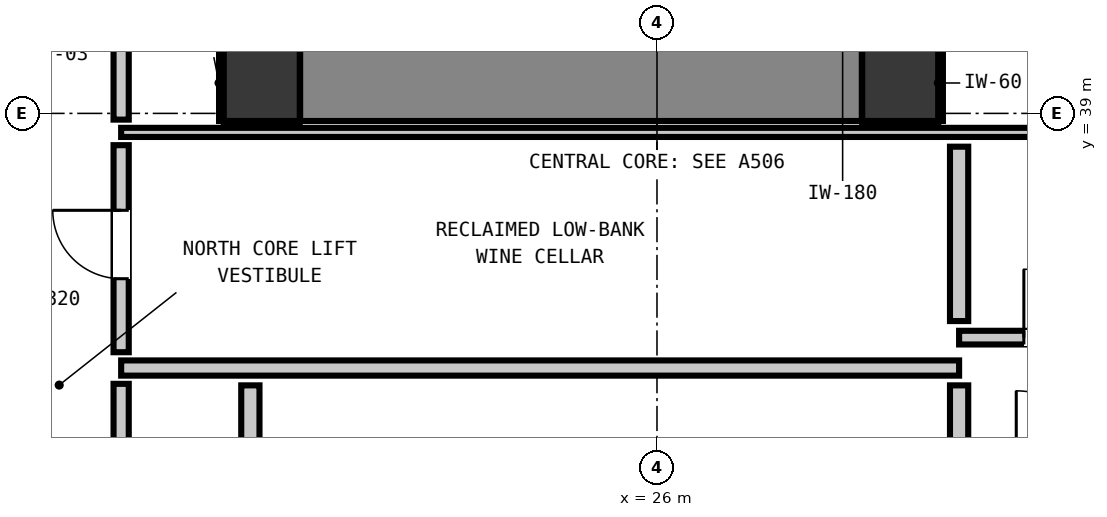
"""IFC4 building model, lengths in metres.
Left out: names, types, materials, properties, quantities, classifications, styles, units other than length and angle.
Written with IfcOpenShell. Run it as: python <this file> out.ifc"""

import sys

from ifc_helpers import new_model, si_unit, direction, frame, frame_2d, origin, origin_2d, place, context, subcontext, project, spatial, rectangle, extrude, element, fill, save


model = new_model("IFC4")
c1 = context("Model", 3, precision=1e-05, world=origin(), true_north=direction((0.0, 1.0)))
c2 = subcontext(c1, "Body", "Model", "MODEL_VIEW")
j1 = project(units=[si_unit("LENGTHUNIT", "METRE"), si_unit("PLANEANGLEUNIT", "RADIAN")], contexts=[c1])
p1 = place(None, origin())
s1 = spatial("IfcSite", under=j1, at=p1, CompositionType="ELEMENT")
p2 = place(p1, origin())
s2 = spatial("IfcBuilding", under=s1, at=p2, CompositionType="ELEMENT")
p3 = place(p2, frame((0.0, 0.0, 109.4)))
s3 = spatial("IfcBuildingStorey", under=s2, at=p3, CompositionType="ELEMENT", Elevation=109.4)
for number, where, z_axis, x_axis in (
    (1, (20.8, 39.4, 0.0), (0.0, 0.0, 1.0), (1.0, 0.0, 0.0)),
    (2, (29.2, 39.4, 0.0), (0.0, 0.0, 1.0), (1.0, 0.0, 0.0)),
):
    element("IfcColumn", number, at=place(p3, frame(where, z_axis=z_axis, x_axis=x_axis)), inside=s3, PredefinedType="COLUMN", context=c2, shape_type="SweptSolid", body=[
        extrude(rectangle(XDim=1.0, YDim=1.0, at=origin_2d()), origin(), (0.0, 0.0, 1.0), 3.32),
    ])
p4 = place(p3, frame((21.305, 39.4, 0.0), z_axis=(0.0, 0.0, 1.0), x_axis=(1.0, 0.0, 0.0)))
e3 = element("IfcWall", 3, at=p4, inside=s3, PredefinedType="SHEAR", context=c2, shape_type="SweptSolid", body=[
    extrude(rectangle(XDim=7.39, YDim=1.0, at=frame_2d((3.695, 0.0))), origin(), (0.0, 0.0, 1.0), 3.32),
])
p5 = place(p3, frame((18.95, 35.65, 0.0), z_axis=(0.0, 0.0, 1.0), x_axis=(1.0, 0.0, 0.0)))
e4 = element("IfcWall", 4, at=p5, inside=s3, PredefinedType="PARTITIONING", context=c2, shape_type="SweptSolid", body=[
    extrude(rectangle(XDim=11.025, YDim=0.2, at=frame_2d((5.513, 0.0))), origin(), (0.0, 0.0, 1.0), 3.08),
])
p6 = place(p3, frame((29.975, 36.05, 0.0), z_axis=(0.0, 0.0, 1.0), x_axis=(1.0, 0.0, 0.0)))
e5 = element("IfcWall", 5, at=p6, inside=s3, PredefinedType="PARTITIONING", context=c2, shape_type="SweptSolid", body=[
    extrude(rectangle(XDim=2.505, YDim=0.18, at=frame_2d((1.252, 0.0))), origin(), (0.0, 0.0, 1.0), 3.08),
])
p7 = place(p6, frame((0.852, 0.0, 0.0)))
e6 = element("IfcOpeningElement", 6, at=p7, cuts=e5, PredefinedType="OPENING", context=c2, shape_type="SweptSolid", body=[
    extrude(rectangle(XDim=0.9, YDim=2.1, at=frame_2d((0.45, 1.05))), frame((0.0, 0.1, 0.0), z_axis=(0.0, -1.0, 0.0), x_axis=(1.0, 0.0, 0.0)), (0.0, 0.0, 1.0), 0.2),
])
p8 = place(p3, frame((18.95, 38.75, 0.0), z_axis=(0.0, 0.0, 1.0), x_axis=(1.0, 0.0, 0.0)))
e7 = element("IfcWall", 7, at=p8, inside=s3, PredefinedType="PARTITIONING", context=c2, shape_type="SweptSolid", body=[
    extrude(rectangle(XDim=13.56, YDim=0.12, at=frame_2d((6.78, 0.0))), origin(), (0.0, 0.0, 1.0), 3.08),
])
p9 = place(p3, frame((20.65, 33.148, 0.0), z_axis=(0.0, 0.0, 1.0), x_axis=(0.0, 1.0, 0.0)))
e8 = element("IfcWall", 8, at=p9, inside=s3, PredefinedType="PARTITIONING", context=c2, shape_type="SweptSolid", body=[
    extrude(rectangle(XDim=2.274, YDim=0.24, at=frame_2d((1.137, 0.0))), origin(), (0.0, 0.0, 1.0), 2.315),
])
p10 = place(p3, frame((29.975, 34.498, 0.0), z_axis=(0.0, 0.0, 1.0), x_axis=(0.0, 1.0, 0.0)))
e9 = element("IfcWall", 9, at=p10, inside=s3, PredefinedType="PARTITIONING", context=c2, shape_type="SweptSolid", body=[
    extrude(rectangle(XDim=0.924, YDim=0.24, at=frame_2d((0.462, 0.0))), origin(), (0.0, 0.0, 1.0), 3.08),
])
p11 = place(p3, frame((29.975, 36.268, 0.0), z_axis=(0.0, 0.0, 1.0), x_axis=(0.0, 1.0, 0.0)))
e10 = element("IfcWall", 10, at=p11, inside=s3, PredefinedType="PARTITIONING", context=c2, shape_type="SweptSolid", body=[
    extrude(rectangle(XDim=2.294, YDim=0.24, at=frame_2d((1.147, 0.0))), origin(), (0.0, 0.0, 1.0), 3.08),
])
p12 = place(p3, frame((18.95, 33.128, 0.0), z_axis=(0.0, 0.0, 1.0), x_axis=(0.0, 1.0, 0.0)))
e11 = element("IfcWall", 11, at=p12, inside=s3, PredefinedType="PARTITIONING", context=c2, shape_type="SweptSolid", body=[
    extrude(rectangle(XDim=2.314, YDim=0.2, at=frame_2d((1.157, 0.0))), origin(), (0.0, 0.0, 1.0), 3.08),
])
p13 = place(p3, frame((18.95, 35.858, 0.0), z_axis=(0.0, 0.0, 1.0), x_axis=(0.0, 1.0, 0.0)))
e12 = element("IfcWall", 12, at=p13, inside=s3, PredefinedType="PARTITIONING", context=c2, shape_type="SweptSolid", body=[
    extrude(rectangle(XDim=2.724, YDim=0.2, at=frame_2d((1.362, 0.0))), origin(), (0.0, 0.0, 1.0), 3.08),
])
p14 = place(p13, frame((0.967, 0.0, 0.0)))
e13 = element("IfcOpeningElement", 13, at=p14, cuts=e12, PredefinedType="OPENING", context=c2, shape_type="SweptSolid", body=[
    extrude(rectangle(XDim=0.9, YDim=2.1, at=frame_2d((0.45, 1.05))), frame((0.0, 0.11, 0.0), z_axis=(0.0, -1.0, 0.0), x_axis=(1.0, 0.0, 0.0)), (0.0, 0.0, 1.0), 0.22),
])
p15 = place(p3, frame((18.95, 38.918, 0.0), z_axis=(0.0, 0.0, 1.0), x_axis=(0.0, 1.0, 0.0)))
e14 = element("IfcWall", 14, at=p15, inside=s3, PredefinedType="PARTITIONING", context=c2, shape_type="SweptSolid", body=[
    extrude(rectangle(XDim=1.134, YDim=0.2, at=frame_2d((0.567, 0.0))), origin(), (0.0, 0.0, 1.0), 3.08),
])
for number, where, z_axis, x_axis in (
    (15, (20.3, 38.868, 0.0), (0.0, 0.0, 1.0), (1.0, 0.0, 0.0)),
    (16, (20.268, 38.9, 0.0), (0.0, 0.0, 1.0), (0.0, 1.0, 0.0)),
    (17, (28.7, 38.868, 0.0), (0.0, 0.0, 1.0), (1.0, 0.0, 0.0)),
    (18, (29.732, 38.9, 0.0), (0.0, 0.0, 1.0), (0.0, 1.0, 0.0)),
):
    element("IfcWall", number, at=place(p3, frame(where, z_axis=z_axis, x_axis=x_axis)), inside=s3, PredefinedType="PARTITIONING", context=c2, shape_type="SweptSolid", body=[
        extrude(rectangle(XDim=1.0, YDim=0.06, at=frame_2d((0.5, 0.0))), origin(), (0.0, 0.0, 1.0), 1.45),
    ])
p16 = place(p7, origin())
e19 = element("IfcDoor", 19, at=p16, inside=s3, OperationType="SINGLE_SWING_LEFT", PredefinedType="DOOR", context=c2, shape_type="SweptSolid", body=[
    extrude(rectangle(XDim=0.9, YDim=2.1, at=frame_2d((0.45, 1.05))), frame((0.0, 0.025, 0.0), z_axis=(0.0, -1.0, 0.0), x_axis=(1.0, 0.0, 0.0)), (0.0, 0.0, 1.0), 0.05),
])
fill(e6, e19)
p17 = place(p14, origin())
e20 = element("IfcDoor", 20, at=p17, inside=s3, OperationType="SINGLE_SWING_RIGHT", PredefinedType="DOOR", context=c2, shape_type="SweptSolid", body=[
    extrude(rectangle(XDim=0.9, YDim=2.1, at=frame_2d((0.45, 1.05))), frame((0.0, 0.025, 0.0), z_axis=(0.0, -1.0, 0.0), x_axis=(1.0, 0.0, 0.0)), (0.0, 0.0, 1.0), 0.05),
])
fill(e13, e20)
save(model, sys.argv[1])
